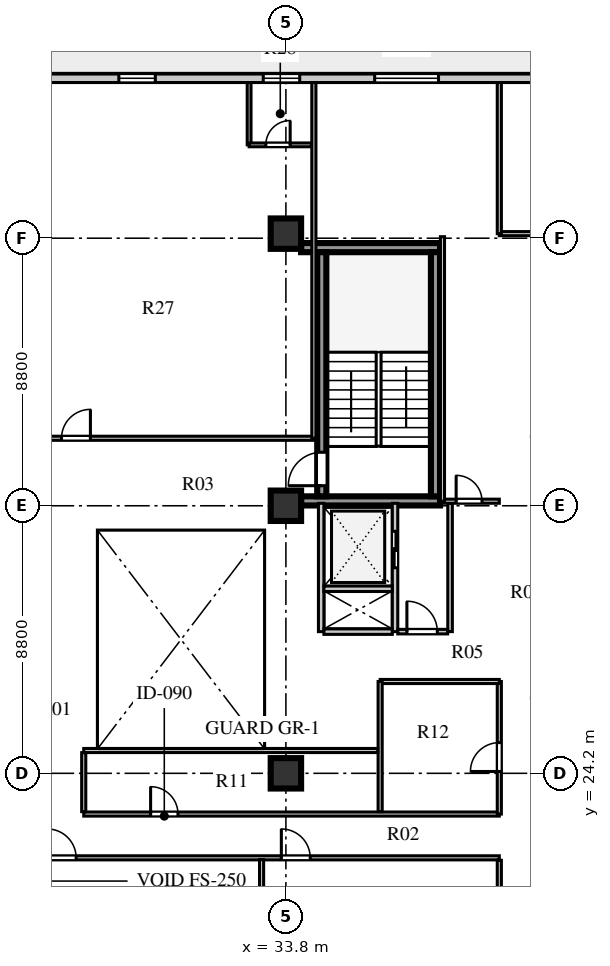
"""IFC4 building model, lengths in metres.
Left out: names, types, materials, properties, quantities, classifications, styles, units other than length and angle.
Written with IfcOpenShell. Run it as: python <this file> out.ifc"""

import sys

from ifc_helpers import new_model, si_unit, direction, frame, frame_2d, origin, origin_2d, place, context, subcontext, project, spatial, rectangle, extrude, element, fill, save


model = new_model("IFC4")
c1 = context("Model", 3, precision=1e-05, world=origin(), true_north=direction((0.0, 1.0)))
c2 = subcontext(c1, "Body", "Model", "MODEL_VIEW")
j1 = project(units=[si_unit("LENGTHUNIT", "METRE"), si_unit("PLANEANGLEUNIT", "RADIAN")], contexts=[c1])
p1 = place(None, origin())
s1 = spatial("IfcSite", under=j1, at=p1, CompositionType="ELEMENT")
p2 = place(p1, origin())
s2 = spatial("IfcBuilding", under=s1, at=p2, CompositionType="ELEMENT")
p3 = place(p2, frame((0.0, 0.0, 119.4)))
s3 = spatial("IfcBuildingStorey", under=s2, at=p3, CompositionType="ELEMENT", Elevation=119.4)
for number, where, z_axis, x_axis in (
    (1, (34.3, 33.16, 0.0), (0.0, 0.0, 1.0), (1.0, 0.0, 0.0)),
    (2, (34.3, 41.49, 0.0), (0.0, 0.0, 1.0), (1.0, 0.0, 0.0)),
):
    element("IfcWall", number, at=place(p3, frame(where, z_axis=z_axis, x_axis=x_axis)), inside=s3, PredefinedType="SHEAR", context=c2, shape_type="SweptSolid", body=[
        extrude(rectangle(XDim=4.57, YDim=0.3, at=frame_2d((2.285, 0.0))), origin(), (0.0, 0.0, 1.0), 3.6),
    ])
p4 = place(p3, frame((34.98, 33.31, 0.0), z_axis=(0.0, 0.0, 1.0), x_axis=(0.0, 1.0, 0.0)))
e3 = element("IfcWall", 3, at=p4, inside=s3, PredefinedType="SHEAR", context=c2, shape_type="SweptSolid", body=[
    extrude(rectangle(XDim=8.03, YDim=0.3, at=frame_2d((4.015, 0.0))), origin(), (0.0, 0.0, 1.0), 3.6),
])
p5 = place(p4, frame((0.35, 0.0, 0.0)))
e4 = element("IfcOpeningElement", 4, at=p5, cuts=e3, PredefinedType="OPENING", context=c2, shape_type="SweptSolid", body=[
    extrude(rectangle(XDim=1.1, YDim=2.1, at=frame_2d((0.55, 1.05))), frame((0.0, 0.16, 0.0), z_axis=(0.0, -1.0, 0.0), x_axis=(1.0, 0.0, 0.0)), (0.0, 0.0, 1.0), 0.32),
])
p6 = place(p3, frame((38.72, 33.31, 0.0), z_axis=(0.0, 0.0, 1.0), x_axis=(0.0, 1.0, 0.0)))
e5 = element("IfcWall", 5, at=p6, inside=s3, PredefinedType="SHEAR", context=c2, shape_type="SweptSolid", body=[
    extrude(rectangle(XDim=8.03, YDim=0.3, at=frame_2d((4.015, 0.0))), origin(), (0.0, 0.0, 1.0), 3.6),
])
for number, where, z_axis, x_axis in (
    (6, (33.8, 24.2, 0.0), (0.0, 0.0, 1.0), (1.0, 0.0, 0.0)),
    (7, (33.8, 33.0, 0.0), (0.0, 0.0, 1.0), (1.0, 0.0, 0.0)),
    (8, (33.8, 41.95, 0.0), (0.0, 0.0, 1.0), (1.0, 0.0, 0.0)),
):
    element("IfcColumn", number, at=place(p3, frame(where, z_axis=z_axis, x_axis=x_axis)), inside=s3, PredefinedType="COLUMN", context=c2, shape_type="SweptSolid", body=[
        extrude(rectangle(XDim=1.0, YDim=1.0, at=origin_2d()), origin(), (0.0, 0.0, 1.0), 3.6),
    ])
p7 = place(p3, frame((45.35, 47.06, 0.0), z_axis=(0.0, 0.0, 1.0), x_axis=(-1.0, 0.0, 0.0)))
e9 = element("IfcWall", 9, at=p7, inside=s3, PredefinedType="STANDARD", context=c2, shape_type="SweptSolid", body=[
    extrude(rectangle(XDim=32.1, YDim=0.28, at=frame_2d((16.05, 0.0))), origin(), (0.0, 0.0, 1.0), 3.6),
])
p8 = place(p7, frame((30.15, 0.0, 0.0)))
e10 = element("IfcOpeningElement", 10, at=p8, cuts=e9, PredefinedType="OPENING", context=c2, shape_type="SweptSolid", body=[
    extrude(rectangle(XDim=1.0, YDim=2.05, at=frame_2d((0.5, 1.025))), frame((0.0, 0.15, 0.0), z_axis=(0.0, -1.0, 0.0), x_axis=(1.0, 0.0, 0.0)), (0.0, 0.0, 1.0), 0.3),
])
p9 = place(p7, frame((24.42, 0.0, 0.8)))
e11 = element("IfcOpeningElement", 11, at=p9, cuts=e9, PredefinedType="OPENING", context=c2, shape_type="SweptSolid", body=[
    extrude(rectangle(XDim=1.5, YDim=2.0, at=frame_2d((0.75, 1.0))), frame((0.0, 0.15, 0.0), z_axis=(0.0, -1.0, 0.0), x_axis=(1.0, 0.0, 0.0)), (0.0, 0.0, 1.0), 0.3),
])
p10 = place(p7, frame((15.845, 0.0, 0.8)))
e12 = element("IfcOpeningElement", 12, at=p10, cuts=e9, PredefinedType="OPENING", context=c2, shape_type="SweptSolid", body=[
    extrude(rectangle(XDim=1.2, YDim=1.75, at=frame_2d((0.6, 0.875))), frame((0.0, 0.15, 0.0), z_axis=(0.0, -1.0, 0.0), x_axis=(1.0, 0.0, 0.0)), (0.0, 0.0, 1.0), 0.3),
])
p11 = place(p7, frame((11.095, 0.0, 0.8)))
e13 = element("IfcOpeningElement", 13, at=p11, cuts=e9, PredefinedType="OPENING", context=c2, shape_type="SweptSolid", body=[
    extrude(rectangle(XDim=1.2, YDim=1.75, at=frame_2d((0.6, 0.875))), frame((0.0, 0.15, 0.0), z_axis=(0.0, -1.0, 0.0), x_axis=(1.0, 0.0, 0.0)), (0.0, 0.0, 1.0), 0.3),
])
p12 = place(p7, frame((6.53, 0.0, 0.8)))
e14 = element("IfcOpeningElement", 14, at=p12, cuts=e9, PredefinedType="OPENING", context=c2, shape_type="SweptSolid", body=[
    extrude(rectangle(XDim=2.1, YDim=1.95, at=frame_2d((1.05, 0.975))), frame((0.0, 0.15, 0.0), z_axis=(0.0, -1.0, 0.0), x_axis=(1.0, 0.0, 0.0)), (0.0, 0.0, 1.0), 0.3),
])
p13 = place(p7, frame((1.645, 0.0, 0.8)))
e15 = element("IfcOpeningElement", 15, at=p13, cuts=e9, PredefinedType="OPENING", context=c2, shape_type="SweptSolid", body=[
    extrude(rectangle(XDim=1.35, YDim=1.9, at=frame_2d((0.675, 0.95))), frame((0.0, 0.15, 0.0), z_axis=(0.0, -1.0, 0.0), x_axis=(1.0, 0.0, 0.0)), (0.0, 0.0, 1.0), 0.3),
])
p14 = place(p3, frame((34.96, 28.86, 0.0), z_axis=(0.0, 0.0, 1.0), x_axis=(0.0, 1.0, 0.0)))
e16 = element("IfcWall", 16, at=p14, inside=s3, PredefinedType="SOLIDWALL", context=c2, shape_type="SweptSolid", body=[
    extrude(rectangle(XDim=4.22, YDim=0.18, at=frame_2d((2.11, 0.0))), origin(), (0.0, 0.0, 1.0), 3.6),
])
p15 = place(p3, frame((37.39, 28.86, 0.0), z_axis=(0.0, 0.0, 1.0), x_axis=(0.0, 1.0, 0.0)))
e17 = element("IfcWall", 17, at=p15, inside=s3, PredefinedType="SOLIDWALL", context=c2, shape_type="SweptSolid", body=[
    extrude(rectangle(XDim=4.22, YDim=0.18, at=frame_2d((2.11, 0.0))), origin(), (0.0, 0.0, 1.0), 3.6),
])
p16 = place(p15, frame((2.1, 0.0, 0.0)))
e18 = element("IfcOpeningElement", 18, at=p16, cuts=e17, PredefinedType="OPENING", context=c2, shape_type="SweptSolid", body=[
    extrude(rectangle(XDim=1.2, YDim=2.12, at=frame_2d((0.6, 1.06))), frame((0.0, 0.1, 0.0), z_axis=(0.0, -1.0, 0.0), x_axis=(1.0, 0.0, 0.0)), (0.0, 0.0, 1.0), 0.2),
])
for number, where, z_axis, x_axis in (
    (19, (35.05, 28.86, 0.0), (0.0, 0.0, 1.0), (1.0, 0.0, 0.0)),
    (20, (35.05, 30.27, 0.0), (0.0, 0.0, 1.0), (1.0, 0.0, 0.0)),
):
    element("IfcWall", number, at=place(p3, frame(where, z_axis=z_axis, x_axis=x_axis)), inside=s3, PredefinedType="SOLIDWALL", context=c2, shape_type="SweptSolid", body=[
        extrude(rectangle(XDim=2.25, YDim=0.18, at=frame_2d((1.125, 0.0))), origin(), (0.0, 0.0, 1.0), 3.6),
    ])
p17 = place(p3, frame((39.2, 28.86, 0.0), z_axis=(0.0, 0.0, 1.0), x_axis=(0.0, 1.0, 0.0)))
e21 = element("IfcWall", 21, at=p17, inside=s3, PredefinedType="PARTITIONING", context=c2, shape_type="SweptSolid", body=[
    extrude(rectangle(XDim=4.22, YDim=0.15, at=frame_2d((2.11, 0.0))), origin(), (0.0, 0.0, 1.0), 3.6),
])
p18 = place(p3, frame((37.48, 28.86, 0.0), z_axis=(0.0, 0.0, 1.0), x_axis=(1.0, 0.0, 0.0)))
e22 = element("IfcWall", 22, at=p18, inside=s3, PredefinedType="PARTITIONING", context=c2, shape_type="SweptSolid", body=[
    extrude(rectangle(XDim=1.64, YDim=0.15, at=frame_2d((0.82, 0.0))), origin(), (0.0, 0.0, 1.0), 3.6),
])
p19 = place(p18, frame((0.3, 0.0, 0.0)))
e23 = element("IfcOpeningElement", 23, at=p19, cuts=e22, PredefinedType="OPENING", context=c2, shape_type="SweptSolid", body=[
    extrude(rectangle(XDim=1.0, YDim=2.1, at=frame_2d((0.5, 1.05))), frame((0.0, 0.085, 0.0), z_axis=(0.0, -1.0, 0.0), x_axis=(1.0, 0.0, 0.0)), (0.0, 0.0, 1.0), 0.17),
])
p20 = place(p3, frame((25.22, 21.42, 0.0), z_axis=(0.0, 0.0, 1.0), x_axis=(1.0, 0.0, 0.0)))
e24 = element("IfcWall", 24, at=p20, inside=s3, PredefinedType="PARTITIONING", context=c2, shape_type="SweptSolid", body=[
    extrude(rectangle(XDim=15.6, YDim=0.135, at=frame_2d((7.8, 0.0))), origin(), (0.0, 0.0, 1.0), 3.2),
])
p21 = place(p20, frame((0.73, 0.0, 0.0)))
e25 = element("IfcOpeningElement", 25, at=p21, cuts=e24, PredefinedType="OPENING", context=c2, shape_type="SweptSolid", body=[
    extrude(rectangle(XDim=0.95, YDim=2.1, at=frame_2d((0.475, 1.05))), frame((0.0, 0.078, 0.0), z_axis=(0.0, -1.0, 0.0), x_axis=(1.0, 0.0, 0.0)), (0.0, 0.0, 1.0), 0.155),
])
p22 = place(p20, frame((8.43, 0.0, 0.0)))
e26 = element("IfcOpeningElement", 26, at=p22, cuts=e24, PredefinedType="OPENING", context=c2, shape_type="SweptSolid", body=[
    extrude(rectangle(XDim=0.95, YDim=2.1, at=frame_2d((0.475, 1.05))), frame((0.0, 0.078, 0.0), z_axis=(0.0, -1.0, 0.0), x_axis=(1.0, 0.0, 0.0)), (0.0, 0.0, 1.0), 0.155),
])
p23 = place(p3, frame((27.15, 22.86, 0.0), z_axis=(0.0, 0.0, 1.0), x_axis=(1.0, 0.0, 0.0)))
e27 = element("IfcWall", 27, at=p23, inside=s3, PredefinedType="PARTITIONING", context=c2, shape_type="SweptSolid", body=[
    extrude(rectangle(XDim=13.67, YDim=0.135, at=frame_2d((6.835, 0.0))), origin(), (0.0, 0.0, 1.0), 3.6),
])
p24 = place(p23, frame((2.2, 0.0, 0.0)))
e28 = element("IfcOpeningElement", 28, at=p24, cuts=e27, PredefinedType="OPENING", context=c2, shape_type="SweptSolid", body=[
    extrude(rectangle(XDim=0.9, YDim=2.08, at=frame_2d((0.45, 1.04))), frame((0.0, 0.078, 0.0), z_axis=(0.0, -1.0, 0.0), x_axis=(1.0, 0.0, 0.0)), (0.0, 0.0, 1.0), 0.155),
])
p25 = place(p3, frame((25.22, 35.22, 0.0), z_axis=(0.0, 0.0, 1.0), x_axis=(1.0, 0.0, 0.0)))
e29 = element("IfcWall", 29, at=p25, inside=s3, PredefinedType="PARTITIONING", context=c2, shape_type="SweptSolid", body=[
    extrude(rectangle(XDim=9.5, YDim=0.135, at=frame_2d((4.75, 0.0))), origin(), (0.0, 0.0, 1.0), 3.6),
])
p26 = place(p25, frame((1.2, 0.0, 0.0)))
e30 = element("IfcOpeningElement", 30, at=p26, cuts=e29, PredefinedType="OPENING", context=c2, shape_type="SweptSolid", body=[
    extrude(rectangle(XDim=0.95, YDim=2.1, at=frame_2d((0.475, 1.05))), frame((0.0, 0.078, 0.0), z_axis=(0.0, -1.0, 0.0), x_axis=(1.0, 0.0, 0.0)), (0.0, 0.0, 1.0), 0.155),
])
p27 = place(p3, frame((40.82, 41.95, 0.0), z_axis=(0.0, 0.0, 1.0), x_axis=(1.0, 0.0, 0.0)))
e31 = element("IfcWall", 31, at=p27, inside=s3, PredefinedType="PARTITIONING", context=c2, shape_type="SweptSolid", body=[
    extrude(rectangle(XDim=7.3, YDim=0.135, at=frame_2d((3.65, 0.0))), origin(), (0.0, 0.0, 1.0), 2.95),
])
p28 = place(p3, frame((40.82, 22.86, 0.0), z_axis=(0.0, 0.0, 1.0), x_axis=(0.0, 1.0, 0.0)))
e32 = element("IfcWall", 32, at=p28, inside=s3, PredefinedType="PARTITIONING", context=c2, shape_type="SweptSolid", body=[
    extrude(rectangle(XDim=4.36, YDim=0.135, at=frame_2d((2.18, 0.0))), origin(), (0.0, 0.0, 1.0), 3.6),
])
p29 = place(p28, frame((1.4, 0.0, 0.0)))
e33 = element("IfcOpeningElement", 33, at=p29, cuts=e32, PredefinedType="OPENING", context=c2, shape_type="SweptSolid", body=[
    extrude(rectangle(XDim=0.95, YDim=2.1, at=frame_2d((0.475, 1.05))), frame((0.0, 0.078, 0.0), z_axis=(0.0, -1.0, 0.0), x_axis=(1.0, 0.0, 0.0)), (0.0, 0.0, 1.0), 0.155),
])
p30 = place(p3, frame((36.9, 27.22, 0.0), z_axis=(0.0, 0.0, 1.0), x_axis=(1.0, 0.0, 0.0)))
e34 = element("IfcWall", 34, at=p30, inside=s3, PredefinedType="PARTITIONING", context=c2, shape_type="SweptSolid", body=[
    extrude(rectangle(XDim=3.92, YDim=0.135, at=frame_2d((1.96, 0.0))), origin(), (0.0, 0.0, 1.0), 3.2),
])
p31 = place(p3, frame((36.9, 22.94, 0.0), z_axis=(0.0, 0.0, 1.0), x_axis=(0.0, 1.0, 0.0)))
e35 = element("IfcWall", 35, at=p31, inside=s3, PredefinedType="PARTITIONING", context=c2, shape_type="SweptSolid", body=[
    extrude(rectangle(XDim=4.28, YDim=0.135, at=frame_2d((2.14, 0.0))), origin(), (0.0, 0.0, 1.0), 3.6),
])
p32 = place(p3, frame((27.15, 24.95, 0.0), z_axis=(0.0, 0.0, 1.0), x_axis=(1.0, 0.0, 0.0)))
e36 = element("IfcWall", 36, at=p32, inside=s3, PredefinedType="PARTITIONING", context=c2, shape_type="SweptSolid", body=[
    extrude(rectangle(XDim=9.67, YDim=0.135, at=frame_2d((4.835, 0.0))), origin(), (0.0, 0.0, 1.0), 3.05),
])
p33 = place(p3, frame((27.15, 22.94, 0.0), z_axis=(0.0, 0.0, 1.0), x_axis=(0.0, 1.0, 0.0)))
e37 = element("IfcWall", 37, at=p33, inside=s3, PredefinedType="PARTITIONING", context=c2, shape_type="SweptSolid", body=[
    extrude(rectangle(XDim=1.94, YDim=0.135, at=frame_2d((0.97, 0.0))), origin(), (0.0, 0.0, 1.0), 3.6),
])
p34 = place(p3, frame((40.82, 10.28, 0.0), z_axis=(0.0, 0.0, 1.0), x_axis=(0.0, 1.0, 0.0)))
e38 = element("IfcWall", 38, at=p34, inside=s3, PredefinedType="PARTITIONING", context=c2, shape_type="SweptSolid", body=[
    extrude(rectangle(XDim=11.06, YDim=0.135, at=frame_2d((5.53, 0.0))), origin(), (0.0, 0.0, 1.0), 3.6),
])
p35 = place(p3, frame((33.0, 10.28, 0.0), z_axis=(0.0, 0.0, 1.0), x_axis=(0.0, 1.0, 0.0)))
e39 = element("IfcWall", 39, at=p35, inside=s3, PredefinedType="PARTITIONING", context=c2, shape_type="SweptSolid", body=[
    extrude(rectangle(XDim=11.08, YDim=0.135, at=frame_2d((5.54, 0.0))), origin(), (0.0, 0.0, 1.0), 3.6),
])
p36 = place(p3, frame((34.72, 35.22, 0.0), z_axis=(0.0, 0.0, 1.0), x_axis=(0.0, 1.0, 0.0)))
e40 = element("IfcWall", 40, at=p36, inside=s3, PredefinedType="PARTITIONING", context=c2, shape_type="SweptSolid", body=[
    extrude(rectangle(XDim=11.7, YDim=0.135, at=frame_2d((5.85, 0.0))), origin(), (0.0, 0.0, 1.0), 3.6),
])
p37 = place(p3, frame((32.59, 44.87, 0.0), z_axis=(0.0, 0.0, 1.0), x_axis=(0.0, 1.0, 0.0)))
e41 = element("IfcWall", 41, at=p37, inside=s3, PredefinedType="PLUMBINGWALL", context=c2, shape_type="SweptSolid", body=[
    extrude(rectangle(XDim=2.05, YDim=0.125, at=frame_2d((1.025, 0.0))), origin(), (0.0, 0.0, 1.0), 3.6),
])
p38 = place(p3, frame((32.59, 44.87, 0.0), z_axis=(0.0, 0.0, 1.0), x_axis=(1.0, 0.0, 0.0)))
e42 = element("IfcWall", 42, at=p38, inside=s3, PredefinedType="PLUMBINGWALL", context=c2, shape_type="SweptSolid", body=[
    extrude(rectangle(XDim=2.05, YDim=0.125, at=frame_2d((1.025, 0.0))), origin(), (0.0, 0.0, 1.0), 3.6),
])
p39 = place(p38, frame((0.55, 0.0, 0.0)))
e43 = element("IfcOpeningElement", 43, at=p39, cuts=e42, PredefinedType="OPENING", context=c2, shape_type="SweptSolid", body=[
    extrude(rectangle(XDim=0.8, YDim=2.05, at=frame_2d((0.4, 1.025))), frame((0.0, 0.073, 0.0), z_axis=(0.0, -1.0, 0.0), x_axis=(1.0, 0.0, 0.0)), (0.0, 0.0, 1.0), 0.145),
])
p40 = place(p3, frame((38.95, 33.15, 0.0), z_axis=(0.0, 0.0, 1.0), x_axis=(1.0, 0.0, 0.0)))
e44 = element("IfcWall", 44, at=p40, inside=s3, PredefinedType="PARTITIONING", context=c2, shape_type="SweptSolid", body=[
    extrude(rectangle(XDim=1.87, YDim=0.135, at=frame_2d((0.935, 0.0))), origin(), (0.0, 0.0, 1.0), 3.6),
])
p41 = place(p40, frame((0.45, 0.0, 0.0)))
e45 = element("IfcOpeningElement", 45, at=p41, cuts=e44, PredefinedType="OPENING", context=c2, shape_type="SweptSolid", body=[
    extrude(rectangle(XDim=0.85, YDim=2.05, at=frame_2d((0.425, 1.025))), frame((0.0, 0.078, 0.0), z_axis=(0.0, -1.0, 0.0), x_axis=(1.0, 0.0, 0.0)), (0.0, 0.0, 1.0), 0.155),
])
p42 = place(p3, frame((38.95, 33.15, 0.0), z_axis=(0.0, 0.0, 1.0), x_axis=(0.0, 1.0, 0.0)))
e46 = element("IfcWall", 46, at=p42, inside=s3, PredefinedType="PARTITIONING", context=c2, shape_type="SweptSolid", body=[
    extrude(rectangle(XDim=8.7, YDim=0.135, at=frame_2d((4.35, 0.0))), origin(), (0.0, 0.0, 1.0), 3.6),
])
p43 = place(p3, frame((40.82, 41.95, 0.0), z_axis=(0.0, 0.0, 1.0), x_axis=(0.0, 1.0, 0.0)))
e47 = element("IfcWall", 47, at=p43, inside=s3, PredefinedType="PARTITIONING", context=c2, shape_type="SweptSolid", body=[
    extrude(rectangle(XDim=4.97, YDim=0.135, at=frame_2d((2.485, 0.0))), origin(), (0.0, 0.0, 1.0), 3.6),
])
p44 = place(p10, origin())
e48 = element("IfcWindow", 48, at=p44, inside=s3, PartitioningType="SINGLE_PANEL", PredefinedType="WINDOW", context=c2, shape_type="SweptSolid", body=[
    extrude(rectangle(XDim=1.2, YDim=1.75, at=frame_2d((0.6, 0.875))), frame((0.0, 0.03, 0.0), z_axis=(0.0, -1.0, 0.0), x_axis=(1.0, 0.0, 0.0)), (0.0, 0.0, 1.0), 0.06),
])
fill(e12, e48)
p45 = place(p11, origin())
e49 = element("IfcWindow", 49, at=p45, inside=s3, PartitioningType="SINGLE_PANEL", PredefinedType="WINDOW", context=c2, shape_type="SweptSolid", body=[
    extrude(rectangle(XDim=1.2, YDim=1.75, at=frame_2d((0.6, 0.875))), frame((0.0, 0.03, 0.0), z_axis=(0.0, -1.0, 0.0), x_axis=(1.0, 0.0, 0.0)), (0.0, 0.0, 1.0), 0.06),
])
fill(e13, e49)
p46 = place(p12, origin())
e50 = element("IfcWindow", 50, at=p46, inside=s3, PartitioningType="SINGLE_PANEL", PredefinedType="WINDOW", context=c2, shape_type="SweptSolid", body=[
    extrude(rectangle(XDim=2.1, YDim=1.95, at=frame_2d((1.05, 0.975))), frame((0.0, 0.03, 0.0), z_axis=(0.0, -1.0, 0.0), x_axis=(1.0, 0.0, 0.0)), (0.0, 0.0, 1.0), 0.06),
])
fill(e14, e50)
p47 = place(p5, origin())
e51 = element("IfcDoor", 51, at=p47, inside=s3, OperationType="SINGLE_SWING_LEFT", PredefinedType="DOOR", context=c2, shape_type="SweptSolid", body=[
    extrude(rectangle(XDim=1.1, YDim=2.1, at=frame_2d((0.55, 1.05))), frame((0.0, 0.025, 0.0), z_axis=(0.0, -1.0, 0.0), x_axis=(1.0, 0.0, 0.0)), (0.0, 0.0, 1.0), 0.05),
])
fill(e4, e51)
p48 = place(p16, frame((1.2, 0.0, 0.0), z_axis=(0.0, 0.0, 1.0), x_axis=(-1.0, 0.0, 0.0)))
e52 = element("IfcDoor", 52, at=p48, inside=s3, OperationType="DOUBLE_DOOR_SLIDING", PredefinedType="DOOR", context=c2, shape_type="SweptSolid", body=[
    extrude(rectangle(XDim=1.2, YDim=2.12, at=frame_2d((0.6, 1.06))), frame((0.0, 0.025, 0.0), z_axis=(0.0, -1.0, 0.0), x_axis=(1.0, 0.0, 0.0)), (0.0, 0.0, 1.0), 0.05),
])
fill(e18, e52)
p49 = place(p19, origin())
e53 = element("IfcDoor", 53, at=p49, inside=s3, OperationType="SINGLE_SWING_LEFT", PredefinedType="DOOR", context=c2, shape_type="SweptSolid", body=[
    extrude(rectangle(XDim=1.0, YDim=2.1, at=frame_2d((0.5, 1.05))), frame((0.0, 0.025, 0.0), z_axis=(0.0, -1.0, 0.0), x_axis=(1.0, 0.0, 0.0)), (0.0, 0.0, 1.0), 0.05),
])
fill(e23, e53)
p50 = place(p24, origin())
e54 = element("IfcDoor", 54, at=p50, inside=s3, OperationType="SINGLE_SWING_LEFT", PredefinedType="DOOR", context=c2, shape_type="SweptSolid", body=[
    extrude(rectangle(XDim=0.9, YDim=2.08, at=frame_2d((0.45, 1.04))), frame((0.0, 0.025, 0.0), z_axis=(0.0, -1.0, 0.0), x_axis=(1.0, 0.0, 0.0)), (0.0, 0.0, 1.0), 0.05),
])
fill(e28, e54)
p51 = place(p29, frame((0.95, 0.0, 0.0), z_axis=(0.0, 0.0, 1.0), x_axis=(-1.0, 0.0, 0.0)))
e55 = element("IfcDoor", 55, at=p51, inside=s3, OperationType="SINGLE_SWING_RIGHT", PredefinedType="DOOR", context=c2, shape_type="SweptSolid", body=[
    extrude(rectangle(XDim=0.95, YDim=2.1, at=frame_2d((0.475, 1.05))), frame((0.0, 0.025, 0.0), z_axis=(0.0, -1.0, 0.0), x_axis=(1.0, 0.0, 0.0)), (0.0, 0.0, 1.0), 0.05),
])
fill(e33, e55)
p52 = place(p21, frame((0.95, 0.0, 0.0), z_axis=(0.0, 0.0, 1.0), x_axis=(-1.0, 0.0, 0.0)))
e56 = element("IfcDoor", 56, at=p52, inside=s3, OperationType="SINGLE_SWING_RIGHT", PredefinedType="DOOR", context=c2, shape_type="SweptSolid", body=[
    extrude(rectangle(XDim=0.95, YDim=2.1, at=frame_2d((0.475, 1.05))), frame((0.0, 0.025, 0.0), z_axis=(0.0, -1.0, 0.0), x_axis=(1.0, 0.0, 0.0)), (0.0, 0.0, 1.0), 0.05),
])
fill(e25, e56)
p53 = place(p22, frame((0.95, 0.0, 0.0), z_axis=(0.0, 0.0, 1.0), x_axis=(-1.0, 0.0, 0.0)))
e57 = element("IfcDoor", 57, at=p53, inside=s3, OperationType="SINGLE_SWING_RIGHT", PredefinedType="DOOR", context=c2, shape_type="SweptSolid", body=[
    extrude(rectangle(XDim=0.95, YDim=2.1, at=frame_2d((0.475, 1.05))), frame((0.0, 0.025, 0.0), z_axis=(0.0, -1.0, 0.0), x_axis=(1.0, 0.0, 0.0)), (0.0, 0.0, 1.0), 0.05),
])
fill(e26, e57)
p54 = place(p26, origin())
e58 = element("IfcDoor", 58, at=p54, inside=s3, OperationType="SINGLE_SWING_RIGHT", PredefinedType="DOOR", context=c2, shape_type="SweptSolid", body=[
    extrude(rectangle(XDim=0.95, YDim=2.1, at=frame_2d((0.475, 1.05))), frame((0.0, 0.025, 0.0), z_axis=(0.0, -1.0, 0.0), x_axis=(1.0, 0.0, 0.0)), (0.0, 0.0, 1.0), 0.05),
])
fill(e30, e58)
p55 = place(p39, frame((0.8, 0.0, 0.0), z_axis=(0.0, 0.0, 1.0), x_axis=(-1.0, 0.0, 0.0)))
e59 = element("IfcDoor", 59, at=p55, inside=s3, OperationType="SINGLE_SWING_LEFT", PredefinedType="DOOR", context=c2, shape_type="SweptSolid", body=[
    extrude(rectangle(XDim=0.8, YDim=2.05, at=frame_2d((0.4, 1.025))), frame((0.0, 0.025, 0.0), z_axis=(0.0, -1.0, 0.0), x_axis=(1.0, 0.0, 0.0)), (0.0, 0.0, 1.0), 0.05),
])
fill(e43, e59)
p56 = place(p41, origin())
e60 = element("IfcDoor", 60, at=p56, inside=s3, OperationType="SINGLE_SWING_LEFT", PredefinedType="DOOR", context=c2, shape_type="SweptSolid", body=[
    extrude(rectangle(XDim=0.85, YDim=2.05, at=frame_2d((0.425, 1.025))), frame((0.0, 0.025, 0.0), z_axis=(0.0, -1.0, 0.0), x_axis=(1.0, 0.0, 0.0)), (0.0, 0.0, 1.0), 0.05),
])
fill(e45, e60)
save(model, sys.argv[1])
